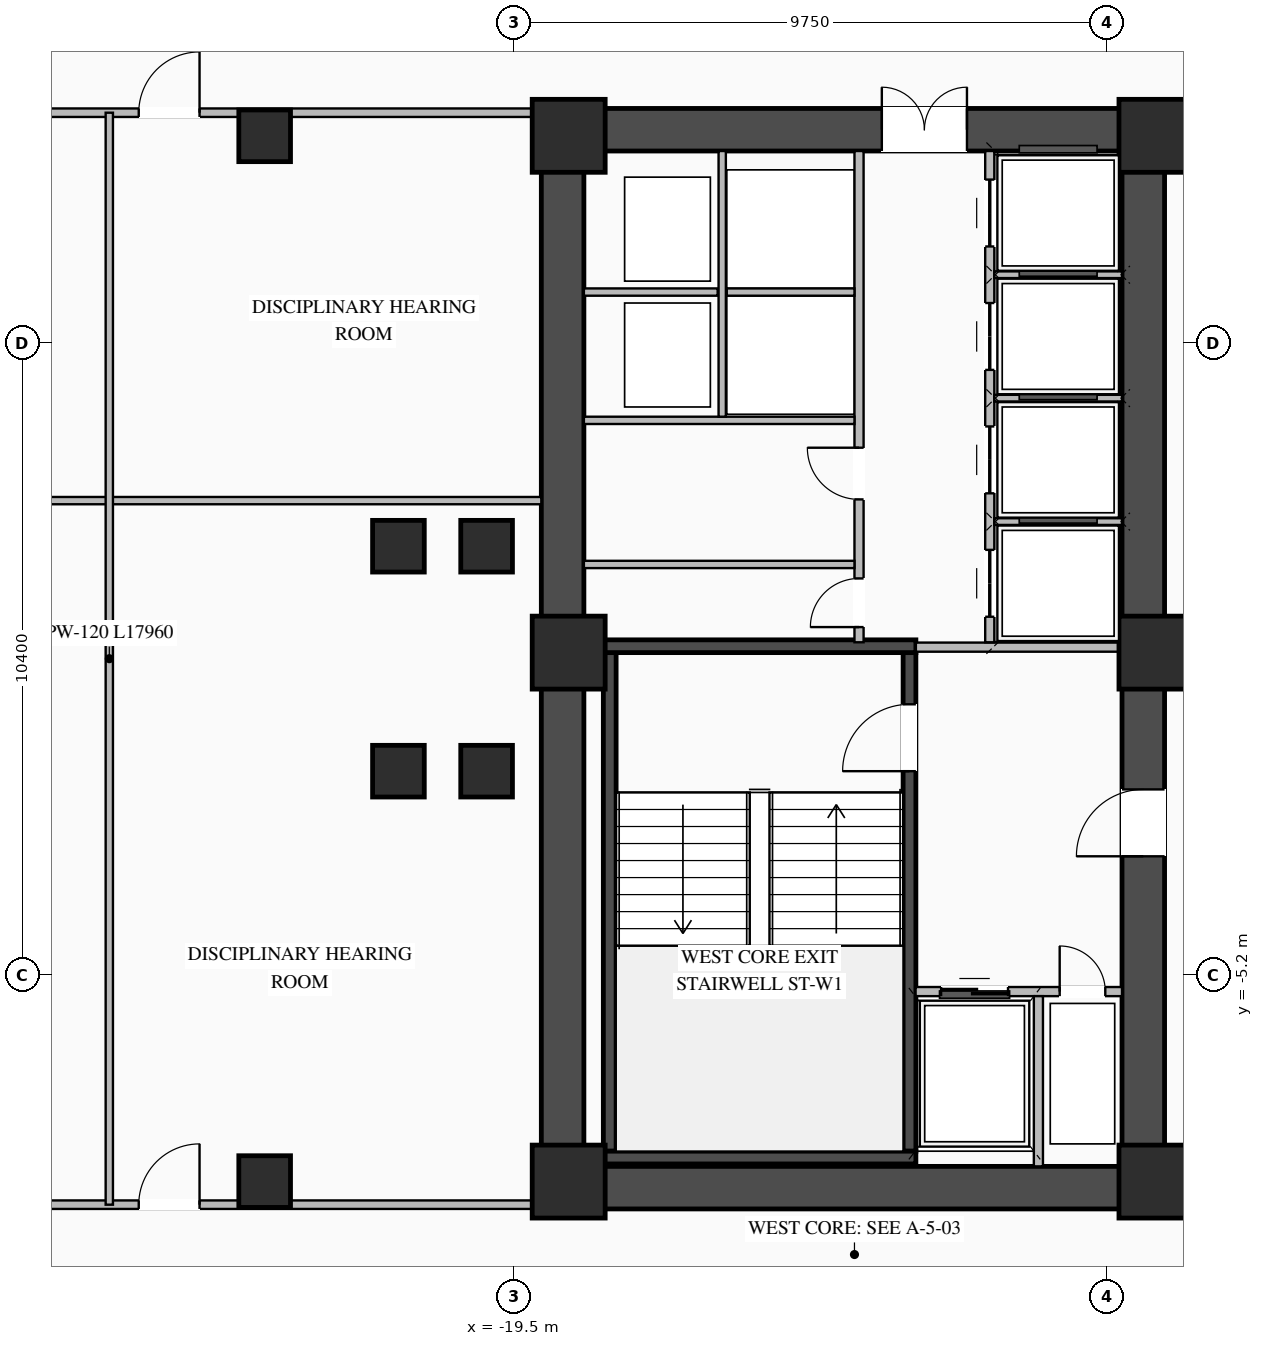
"""IFC4 building model, lengths in metres.
Left out: names, types, materials, properties, quantities, classifications, styles, units other than length and angle.
Written with IfcOpenShell. Run it as: python <this file> out.ifc"""

import sys

from ifc_helpers import new_model, si_unit, direction, frame, frame_2d, origin, origin_2d, place, context, subcontext, project, spatial, rectangle, i_section, extrude, element, fill, save


model = new_model("IFC4")
c1 = context("Model", 3, precision=1e-05, world=origin(), true_north=direction((0.0, 1.0)))
c2 = subcontext(c1, "Body", "Model", "MODEL_VIEW")
j1 = project(units=[si_unit("LENGTHUNIT", "METRE"), si_unit("PLANEANGLEUNIT", "RADIAN")], contexts=[c1])
p1 = place(None, origin())
s1 = spatial("IfcSite", under=j1, at=p1, CompositionType="ELEMENT")
p2 = place(p1, origin())
s2 = spatial("IfcBuilding", under=s1, at=p2, CompositionType="ELEMENT")
p3 = place(p2, frame((0.0, 0.0, 58.8)))
s3 = spatial("IfcBuildingStorey", under=s2, at=p3, CompositionType="ELEMENT", Elevation=58.8)
p4 = place(p3, frame((-19.05, -8.7, 0.0), z_axis=(0.0, 0.0, 1.0), x_axis=(1.0, 0.0, 0.0)))
e1 = element("IfcWall", 1, at=p4, inside=s3, PredefinedType="SHEAR", context=c2, shape_type="SweptSolid", body=[
    extrude(rectangle(XDim=10.25, YDim=0.7, at=frame_2d((5.125, 0.0))), origin(), (0.0, 0.0, 1.0), 3.27),
])
p5 = place(p3, frame((-19.05, 8.7, 0.0), z_axis=(0.0, 0.0, 1.0), x_axis=(1.0, 0.0, 0.0)))
e2 = element("IfcWall", 2, at=p5, inside=s3, PredefinedType="SHEAR", context=c2, shape_type="SweptSolid", body=[
    extrude(rectangle(XDim=10.25, YDim=0.7, at=frame_2d((5.125, 0.0))), origin(), (0.0, 0.0, 1.0), 3.27),
])
p6 = place(p5, frame((5.6, 0.0, 0.0)))
e3 = element("IfcOpeningElement", 3, at=p6, cuts=e2, PredefinedType="OPENING", context=c2, shape_type="SweptSolid", body=[
    extrude(rectangle(XDim=1.4, YDim=2.05, at=frame_2d((0.7, 1.025))), frame((0.0, 0.36, 0.0), z_axis=(0.0, -1.0, 0.0), x_axis=(1.0, 0.0, 0.0)), (0.0, 0.0, 1.0), 0.72),
])
p7 = place(p3, frame((-18.7, -8.35, 0.0), z_axis=(0.0, 0.0, 1.0), x_axis=(0.0, 1.0, 0.0)))
e4 = element("IfcWall", 4, at=p7, inside=s3, PredefinedType="SHEAR", context=c2, shape_type="SweptSolid", body=[
    extrude(rectangle(XDim=16.7, YDim=0.7, at=frame_2d((8.35, 0.0))), origin(), (0.0, 0.0, 1.0), 3.27),
])
p8 = place(p3, frame((-9.15, -8.35, 0.0), z_axis=(0.0, 0.0, 1.0), x_axis=(0.0, 1.0, 0.0)))
e5 = element("IfcWall", 5, at=p8, inside=s3, PredefinedType="SHEAR", context=c2, shape_type="SweptSolid", body=[
    extrude(rectangle(XDim=16.7, YDim=0.7, at=frame_2d((8.35, 0.0))), origin(), (0.0, 0.0, 1.0), 3.27),
])
p9 = place(p8, frame((5.1, 0.0, 0.0)))
e6 = element("IfcOpeningElement", 6, at=p9, cuts=e5, PredefinedType="OPENING", context=c2, shape_type="SweptSolid", body=[
    extrude(rectangle(XDim=1.1, YDim=2.08, at=frame_2d((0.55, 1.04))), frame((0.0, 0.36, 0.0), z_axis=(0.0, -1.0, 0.0), x_axis=(1.0, 0.0, 0.0)), (0.0, 0.0, 1.0), 0.72),
])
p10 = place(p3, frame((-12.995, -8.1, 0.0), z_axis=(0.0, 0.0, 1.0), x_axis=(0.0, 1.0, 0.0)))
e7 = element("IfcWall", 7, at=p10, inside=s3, PredefinedType="SHEAR", context=c2, shape_type="SweptSolid", body=[
    extrude(rectangle(XDim=8.2, YDim=0.21, at=frame_2d((4.1, 0.0))), origin(), (0.0, 0.0, 1.0), 3.27),
])
p11 = place(p10, frame((6.25, 0.0, 0.0)))
e8 = element("IfcOpeningElement", 8, at=p11, cuts=e7, PredefinedType="OPENING", context=c2, shape_type="SweptSolid", body=[
    extrude(rectangle(XDim=1.1, YDim=2.15, at=frame_2d((0.55, 1.075))), frame((0.0, 0.115, 0.0), z_axis=(0.0, -1.0, 0.0), x_axis=(1.0, 0.0, 0.0)), (0.0, 0.0, 1.0), 0.23),
])
p12 = place(p3, frame((-17.925, -8.1, 0.0), z_axis=(0.0, 0.0, 1.0), x_axis=(0.0, 1.0, 0.0)))
e9 = element("IfcWall", 9, at=p12, inside=s3, PredefinedType="SHEAR", context=c2, shape_type="SweptSolid", body=[
    extrude(rectangle(XDim=8.2, YDim=0.21, at=frame_2d((4.1, 0.0))), origin(), (0.0, 0.0, 1.0), 3.27),
])
for number, where, z_axis, x_axis in (
    (10, (-18.03, -8.205, 0.0), (0.0, 0.0, 1.0), (1.0, 0.0, 0.0)),
    (11, (-12.89, 0.205, 0.0), (0.0, 0.0, 1.0), (-1.0, 0.0, 0.0)),
):
    element("IfcWall", number, at=place(p3, frame(where, z_axis=z_axis, x_axis=x_axis)), inside=s3, PredefinedType="SHEAR", context=c2, shape_type="SweptSolid", body=[
        extrude(rectangle(XDim=5.14, YDim=0.21, at=frame_2d((2.57, 0.0))), origin(), (0.0, 0.0, 1.0), 3.27),
    ])
for number, where, z_axis, x_axis in (
    (12, (-8.95, -8.6, 0.0), (0.0, 0.0, 1.0), (1.0, 0.0, 0.0)),
    (13, (-8.95, 0.1, 0.0), (0.0, 0.0, 1.0), (1.0, 0.0, 0.0)),
    (14, (-8.95, 8.6, 0.0), (0.0, 0.0, 1.0), (1.0, 0.0, 0.0)),
    (15, (-18.6, -8.6, 0.0), (0.0, 0.0, 1.0), (1.0, 0.0, 0.0)),
    (16, (-18.6, 0.1, 0.0), (0.0, 0.0, 1.0), (1.0, 0.0, 0.0)),
    (17, (-18.6, 8.6, 0.0), (0.0, 0.0, 1.0), (1.0, 0.0, 0.0)),
):
    element("IfcColumn", number, at=place(p3, frame(where, z_axis=z_axis, x_axis=x_axis)), inside=s3, PredefinedType="COLUMN", context=c2, shape_type="SweptSolid", body=[
        extrude(rectangle(XDim=1.2, YDim=1.2, at=origin_2d()), origin(), (0.0, 0.0, 1.0), 3.45),
    ])
for number, where, z_axis, x_axis in (
    (18, (-21.4, -1.85, 0.0), (0.0, 0.0, 1.0), (1.0, 0.0, 0.0)),
    (19, (-21.4, 1.85, 0.0), (0.0, 0.0, 1.0), (1.0, 0.0, 0.0)),
    (20, (-19.95, -1.85, 0.0), (0.0, 0.0, 1.0), (1.0, 0.0, 0.0)),
    (21, (-19.95, 1.85, 0.0), (0.0, 0.0, 1.0), (1.0, 0.0, 0.0)),
    (22, (-23.6, -8.6, 0.0), (0.0, 0.0, 1.0), (1.0, 0.0, 0.0)),
    (23, (-23.6, 8.6, 0.0), (0.0, 0.0, 1.0), (1.0, 0.0, 0.0)),
):
    element("IfcColumn", number, at=place(p3, frame(where, z_axis=z_axis, x_axis=x_axis)), inside=s3, PredefinedType="COLUMN", context=c2, shape_type="SweptSolid", body=[
        extrude(i_section(OverallWidth=0.85, OverallDepth=0.85, WebThickness=0.032, FlangeThickness=0.048, at=origin_2d()), origin(), (0.0, 0.0, 1.0), 3.45),
    ])
p13 = place(p3, frame((-12.895, -5.475, 0.0), z_axis=(0.0, 0.0, 1.0), x_axis=(1.0, 0.0, 0.0)))
e24 = element("IfcWall", 24, at=p13, inside=s3, PredefinedType="STANDARD", context=c2, shape_type="SweptSolid", body=[
    extrude(rectangle(XDim=3.395, YDim=0.15, at=frame_2d((1.698, 0.0))), origin(), (0.0, 0.0, 1.0), 3.25),
])
p14 = place(p13, frame((0.42, 0.0, 0.0)))
e25 = element("IfcOpeningElement", 25, at=p14, cuts=e24, PredefinedType="OPENING", context=c2, shape_type="SweptSolid", body=[
    extrude(rectangle(XDim=1.1, YDim=2.15, at=frame_2d((0.55, 1.075))), frame((0.0, 0.085, 0.0), z_axis=(0.0, -1.0, 0.0), x_axis=(1.0, 0.0, 0.0)), (0.0, 0.0, 1.0), 0.17),
])
p15 = place(p13, frame((2.37, 0.0, 0.0)))
e26 = element("IfcOpeningElement", 26, at=p15, cuts=e24, PredefinedType="OPENING", context=c2, shape_type="SweptSolid", body=[
    extrude(rectangle(XDim=0.75, YDim=2.05, at=frame_2d((0.375, 1.025))), frame((0.0, 0.085, 0.0), z_axis=(0.0, -1.0, 0.0), x_axis=(1.0, 0.0, 0.0)), (0.0, 0.0, 1.0), 0.17),
])
p16 = place(p3, frame((-10.875, -8.35, 0.0), z_axis=(0.0, 0.0, 1.0), x_axis=(0.0, 1.0, 0.0)))
e27 = element("IfcWall", 27, at=p16, inside=s3, PredefinedType="STANDARD", context=c2, shape_type="SweptSolid", body=[
    extrude(rectangle(XDim=2.8, YDim=0.15, at=frame_2d((1.4, 0.0))), origin(), (0.0, 0.0, 1.0), 3.25),
])
p17 = place(p3, frame((-12.89, 0.19, 0.0), z_axis=(0.0, 0.0, 1.0), x_axis=(1.0, 0.0, 0.0)))
e28 = element("IfcWall", 28, at=p17, inside=s3, PredefinedType="STANDARD", context=c2, shape_type="SweptSolid", body=[
    extrude(rectangle(XDim=3.39, YDim=0.15, at=frame_2d((1.695, 0.0))), origin(), (0.0, 0.0, 1.0), 2.645),
])
p18 = place(p3, frame((-11.675, 0.27, 0.0), z_axis=(0.0, 0.0, 1.0), x_axis=(0.0, 1.0, 0.0)))
e29 = element("IfcWall", 29, at=p18, inside=s3, PredefinedType="STANDARD", context=c2, shape_type="SweptSolid", body=[
    extrude(rectangle(XDim=8.08, YDim=0.15, at=frame_2d((4.04, 0.0))), origin(), (0.0, 0.0, 1.0), 3.25),
])
p19 = place(p18, frame((0.42, 0.0, 0.0)))
e30 = element("IfcOpeningElement", 30, at=p19, cuts=e29, PredefinedType="OPENING", context=c2, shape_type="SweptSolid", body=[
    extrude(rectangle(XDim=1.1, YDim=2.1, at=frame_2d((0.55, 1.05))), frame((0.0, 0.085, 0.0), z_axis=(0.0, -1.0, 0.0), x_axis=(1.0, 0.0, 0.0)), (0.0, 0.0, 1.0), 0.17),
])
p20 = place(p18, frame((2.45, 0.0, 0.0)))
e31 = element("IfcOpeningElement", 31, at=p20, cuts=e29, PredefinedType="OPENING", context=c2, shape_type="SweptSolid", body=[
    extrude(rectangle(XDim=1.1, YDim=2.1, at=frame_2d((0.55, 1.05))), frame((0.0, 0.085, 0.0), z_axis=(0.0, -1.0, 0.0), x_axis=(1.0, 0.0, 0.0)), (0.0, 0.0, 1.0), 0.17),
])
p21 = place(p18, frame((4.48, 0.0, 0.0)))
e32 = element("IfcOpeningElement", 32, at=p21, cuts=e29, PredefinedType="OPENING", context=c2, shape_type="SweptSolid", body=[
    extrude(rectangle(XDim=1.1, YDim=2.1, at=frame_2d((0.55, 1.05))), frame((0.0, 0.085, 0.0), z_axis=(0.0, -1.0, 0.0), x_axis=(1.0, 0.0, 0.0)), (0.0, 0.0, 1.0), 0.17),
])
p22 = place(p18, frame((6.51, 0.0, 0.0)))
e33 = element("IfcOpeningElement", 33, at=p22, cuts=e29, PredefinedType="OPENING", context=c2, shape_type="SweptSolid", body=[
    extrude(rectangle(XDim=1.1, YDim=2.1, at=frame_2d((0.55, 1.05))), frame((0.0, 0.085, 0.0), z_axis=(0.0, -1.0, 0.0), x_axis=(1.0, 0.0, 0.0)), (0.0, 0.0, 1.0), 0.17),
])
for number, where, z_axis, x_axis in (
    (34, (-11.6, 2.255, 0.0), (0.0, 0.0, 1.0), (1.0, 0.0, 0.0)),
    (35, (-11.6, 4.285, 0.0), (0.0, 0.0, 1.0), (1.0, 0.0, 0.0)),
    (36, (-11.6, 6.315, 0.0), (0.0, 0.0, 1.0), (1.0, 0.0, 0.0)),
):
    element("IfcWall", number, at=place(p3, frame(where, z_axis=z_axis, x_axis=x_axis)), inside=s3, PredefinedType="STANDARD", context=c2, shape_type="SweptSolid", body=[
        extrude(rectangle(XDim=2.1, YDim=0.11, at=frame_2d((1.05, 0.0))), origin(), (0.0, 0.0, 1.0), 3.25),
    ])
p23 = place(p3, frame((-13.825, 0.27, 0.0), z_axis=(0.0, 0.0, 1.0), x_axis=(0.0, 1.0, 0.0)))
e37 = element("IfcWall", 37, at=p23, inside=s3, PredefinedType="STANDARD", context=c2, shape_type="SweptSolid", body=[
    extrude(rectangle(XDim=8.08, YDim=0.15, at=frame_2d((4.04, 0.0))), origin(), (0.0, 0.0, 1.0), 3.25),
])
p24 = place(p23, frame((0.25, 0.0, 0.0)))
e38 = element("IfcOpeningElement", 38, at=p24, cuts=e37, PredefinedType="OPENING", context=c2, shape_type="SweptSolid", body=[
    extrude(rectangle(XDim=0.8, YDim=2.05, at=frame_2d((0.4, 1.025))), frame((0.0, 0.085, 0.0), z_axis=(0.0, -1.0, 0.0), x_axis=(1.0, 0.0, 0.0)), (0.0, 0.0, 1.0), 0.17),
])
p25 = place(p23, frame((2.35, 0.0, 0.0)))
e39 = element("IfcOpeningElement", 39, at=p25, cuts=e37, PredefinedType="OPENING", context=c2, shape_type="SweptSolid", body=[
    extrude(rectangle(XDim=0.85, YDim=2.05, at=frame_2d((0.425, 1.025))), frame((0.0, 0.085, 0.0), z_axis=(0.0, -1.0, 0.0), x_axis=(1.0, 0.0, 0.0)), (0.0, 0.0, 1.0), 0.17),
])
p26 = place(p3, frame((-18.35, 3.92, 0.0), z_axis=(0.0, 0.0, 1.0), x_axis=(1.0, 0.0, 0.0)))
e40 = element("IfcWall", 40, at=p26, inside=s3, PredefinedType="STANDARD", context=c2, shape_type="SweptSolid", body=[
    extrude(rectangle(XDim=4.45, YDim=0.12, at=frame_2d((2.225, 0.0))), origin(), (0.0, 0.0, 1.0), 3.25),
])
p27 = place(p3, frame((-18.35, 6.03, 0.0), z_axis=(0.0, 0.0, 1.0), x_axis=(1.0, 0.0, 0.0)))
e41 = element("IfcWall", 41, at=p27, inside=s3, PredefinedType="STANDARD", context=c2, shape_type="SweptSolid", body=[
    extrude(rectangle(XDim=2.2, YDim=0.12, at=frame_2d((1.1, 0.0))), origin(), (0.0, 0.0, 1.0), 3.25),
])
p28 = place(p3, frame((-16.075, 3.98, 0.0), z_axis=(0.0, 0.0, 1.0), x_axis=(0.0, 1.0, 0.0)))
e42 = element("IfcWall", 42, at=p28, inside=s3, PredefinedType="STANDARD", context=c2, shape_type="SweptSolid", body=[
    extrude(rectangle(XDim=4.37, YDim=0.12, at=frame_2d((2.185, 0.0))), origin(), (0.0, 0.0, 1.0), 3.25),
])
p29 = place(p3, frame((-16.0, 6.03, 0.0), z_axis=(0.0, 0.0, 1.0), x_axis=(1.0, 0.0, 0.0)))
e43 = element("IfcWall", 43, at=p29, inside=s3, PredefinedType="STANDARD", context=c2, shape_type="SweptSolid", body=[
    extrude(rectangle(XDim=2.1, YDim=0.12, at=frame_2d((1.05, 0.0))), origin(), (0.0, 0.0, 1.0), 3.25),
])
p30 = place(p3, frame((-18.35, 1.55, 0.0), z_axis=(0.0, 0.0, 1.0), x_axis=(1.0, 0.0, 0.0)))
e44 = element("IfcWall", 44, at=p30, inside=s3, PredefinedType="STANDARD", context=c2, shape_type="SweptSolid", body=[
    extrude(rectangle(XDim=4.45, YDim=0.12, at=frame_2d((2.225, 0.0))), origin(), (0.0, 0.0, 1.0), 3.25),
])
p31 = place(p3, frame((-35.62, 8.98, 0.0), z_axis=(0.0, 0.0, 1.0), x_axis=(1.0, 0.0, 0.0)))
e45 = element("IfcWall", 45, at=p31, inside=s3, PredefinedType="STANDARD", context=c2, shape_type="SweptSolid", body=[
    extrude(rectangle(XDim=16.57, YDim=0.14, at=frame_2d((8.285, 0.0))), origin(), (0.0, 0.0, 1.0), 3.25),
])
p32 = place(p31, frame((4.363, 0.0, 0.0)))
e46 = element("IfcOpeningElement", 46, at=p32, cuts=e45, PredefinedType="OPENING", context=c2, shape_type="SweptSolid", body=[
    extrude(rectangle(XDim=1.0, YDim=2.08, at=frame_2d((0.5, 1.04))), frame((0.0, 0.08, 0.0), z_axis=(0.0, -1.0, 0.0), x_axis=(1.0, 0.0, 0.0)), (0.0, 0.0, 1.0), 0.16),
])
p33 = place(p31, frame((9.949, 0.0, 0.0)))
e47 = element("IfcOpeningElement", 47, at=p33, cuts=e45, PredefinedType="OPENING", context=c2, shape_type="SweptSolid", body=[
    extrude(rectangle(XDim=1.0, YDim=2.08, at=frame_2d((0.5, 1.04))), frame((0.0, 0.08, 0.0), z_axis=(0.0, -1.0, 0.0), x_axis=(1.0, 0.0, 0.0)), (0.0, 0.0, 1.0), 0.16),
])
p34 = place(p3, frame((-35.62, -8.98, 0.0), z_axis=(0.0, 0.0, 1.0), x_axis=(1.0, 0.0, 0.0)))
e48 = element("IfcWall", 48, at=p34, inside=s3, PredefinedType="STANDARD", context=c2, shape_type="SweptSolid", body=[
    extrude(rectangle(XDim=16.57, YDim=0.14, at=frame_2d((8.285, 0.0))), origin(), (0.0, 0.0, 1.0), 3.25),
])
p35 = place(p34, frame((4.363, 0.0, 0.0)))
e49 = element("IfcOpeningElement", 49, at=p35, cuts=e48, PredefinedType="OPENING", context=c2, shape_type="SweptSolid", body=[
    extrude(rectangle(XDim=1.0, YDim=2.08, at=frame_2d((0.5, 1.04))), frame((0.0, 0.08, 0.0), z_axis=(0.0, -1.0, 0.0), x_axis=(1.0, 0.0, 0.0)), (0.0, 0.0, 1.0), 0.16),
])
p36 = place(p34, frame((9.949, 0.0, 0.0)))
e50 = element("IfcOpeningElement", 50, at=p36, cuts=e48, PredefinedType="OPENING", context=c2, shape_type="SweptSolid", body=[
    extrude(rectangle(XDim=1.0, YDim=2.08, at=frame_2d((0.5, 1.04))), frame((0.0, 0.08, 0.0), z_axis=(0.0, -1.0, 0.0), x_axis=(1.0, 0.0, 0.0)), (0.0, 0.0, 1.0), 0.16),
])
p37 = place(p3, frame((-35.62, 2.6, 0.0), z_axis=(0.0, 0.0, 1.0), x_axis=(1.0, 0.0, 0.0)))
e51 = element("IfcWall", 51, at=p37, inside=s3, PredefinedType="STANDARD", context=c2, shape_type="SweptSolid", body=[
    extrude(rectangle(XDim=16.57, YDim=0.12, at=frame_2d((8.285, 0.0))), origin(), (0.0, 0.0, 1.0), 3.25),
])
p38 = place(p3, frame((-26.155, -8.98, 0.0), z_axis=(0.0, 0.0, 1.0), x_axis=(0.0, 1.0, 0.0)))
e52 = element("IfcWall", 52, at=p38, inside=s3, PredefinedType="STANDARD", context=c2, shape_type="SweptSolid", body=[
    extrude(rectangle(XDim=17.96, YDim=0.12, at=frame_2d((8.98, 0.0))), origin(), (0.0, 0.0, 1.0), 3.25),
])
p39 = place(p11, origin())
e53 = element("IfcDoor", 53, at=p39, inside=s3, OperationType="SINGLE_SWING_LEFT", PredefinedType="DOOR", context=c2, shape_type="SweptSolid", body=[
    extrude(rectangle(XDim=1.1, YDim=2.15, at=frame_2d((0.55, 1.075))), frame((0.0, 0.025, 0.0), z_axis=(0.0, -1.0, 0.0), x_axis=(1.0, 0.0, 0.0)), (0.0, 0.0, 1.0), 0.05),
])
fill(e8, e53)
p40 = place(p14, origin())
e54 = element("IfcDoor", 54, at=p40, inside=s3, OperationType="DOUBLE_DOOR_SLIDING", PredefinedType="DOOR", context=c2, shape_type="SweptSolid", body=[
    extrude(rectangle(XDim=1.1, YDim=2.15, at=frame_2d((0.55, 1.075))), frame((0.0, 0.025, 0.0), z_axis=(0.0, -1.0, 0.0), x_axis=(1.0, 0.0, 0.0)), (0.0, 0.0, 1.0), 0.05),
])
fill(e25, e54)
p41 = place(p15, origin())
e55 = element("IfcDoor", 55, at=p41, inside=s3, OperationType="SINGLE_SWING_LEFT", PredefinedType="DOOR", context=c2, shape_type="SweptSolid", body=[
    extrude(rectangle(XDim=0.75, YDim=2.05, at=frame_2d((0.375, 1.025))), frame((0.0, 0.025, 0.0), z_axis=(0.0, -1.0, 0.0), x_axis=(1.0, 0.0, 0.0)), (0.0, 0.0, 1.0), 0.05),
])
fill(e26, e55)
p42 = place(p9, origin())
e56 = element("IfcDoor", 56, at=p42, inside=s3, OperationType="SINGLE_SWING_LEFT", PredefinedType="DOOR", context=c2, shape_type="SweptSolid", body=[
    extrude(rectangle(XDim=1.1, YDim=2.08, at=frame_2d((0.55, 1.04))), frame((0.0, 0.305, 0.0), z_axis=(0.0, -1.0, 0.0), x_axis=(1.0, 0.0, 0.0)), (0.0, 0.0, 1.0), 0.05),
])
fill(e6, e56)
p43 = place(p6, origin())
e57 = element("IfcDoor", 57, at=p43, inside=s3, OperationType="DOUBLE_DOOR_SINGLE_SWING", PredefinedType="DOOR", context=c2, shape_type="SweptSolid", body=[
    extrude(rectangle(XDim=1.4, YDim=2.05, at=frame_2d((0.7, 1.025))), frame((0.0, 0.295, 0.0), z_axis=(0.0, -1.0, 0.0), x_axis=(1.0, 0.0, 0.0)), (0.0, 0.0, 1.0), 0.05),
])
fill(e3, e57)
p44 = place(p19, origin())
e58 = element("IfcDoor", 58, at=p44, inside=s3, OperationType="DOUBLE_DOOR_SLIDING", PredefinedType="DOOR", context=c2, shape_type="SweptSolid", body=[
    extrude(rectangle(XDim=1.1, YDim=2.1, at=frame_2d((0.55, 1.05))), frame((0.0, 0.025, 0.0), z_axis=(0.0, -1.0, 0.0), x_axis=(1.0, 0.0, 0.0)), (0.0, 0.0, 1.0), 0.05),
])
fill(e30, e58)
p45 = place(p20, origin())
e59 = element("IfcDoor", 59, at=p45, inside=s3, OperationType="DOUBLE_DOOR_SLIDING", PredefinedType="DOOR", context=c2, shape_type="SweptSolid", body=[
    extrude(rectangle(XDim=1.1, YDim=2.1, at=frame_2d((0.55, 1.05))), frame((0.0, 0.025, 0.0), z_axis=(0.0, -1.0, 0.0), x_axis=(1.0, 0.0, 0.0)), (0.0, 0.0, 1.0), 0.05),
])
fill(e31, e59)
p46 = place(p21, origin())
e60 = element("IfcDoor", 60, at=p46, inside=s3, OperationType="DOUBLE_DOOR_SLIDING", PredefinedType="DOOR", context=c2, shape_type="SweptSolid", body=[
    extrude(rectangle(XDim=1.1, YDim=2.1, at=frame_2d((0.55, 1.05))), frame((0.0, 0.025, 0.0), z_axis=(0.0, -1.0, 0.0), x_axis=(1.0, 0.0, 0.0)), (0.0, 0.0, 1.0), 0.05),
])
fill(e32, e60)
p47 = place(p22, origin())
e61 = element("IfcDoor", 61, at=p47, inside=s3, OperationType="DOUBLE_DOOR_SLIDING", PredefinedType="DOOR", context=c2, shape_type="SweptSolid", body=[
    extrude(rectangle(XDim=1.1, YDim=2.1, at=frame_2d((0.55, 1.05))), frame((0.0, 0.025, 0.0), z_axis=(0.0, -1.0, 0.0), x_axis=(1.0, 0.0, 0.0)), (0.0, 0.0, 1.0), 0.05),
])
fill(e33, e61)
p48 = place(p24, origin())
e62 = element("IfcDoor", 62, at=p48, inside=s3, OperationType="SINGLE_SWING_LEFT", PredefinedType="DOOR", context=c2, shape_type="SweptSolid", body=[
    extrude(rectangle(XDim=0.8, YDim=2.05, at=frame_2d((0.4, 1.025))), frame((0.0, 0.025, 0.0), z_axis=(0.0, -1.0, 0.0), x_axis=(1.0, 0.0, 0.0)), (0.0, 0.0, 1.0), 0.05),
])
fill(e38, e62)
p49 = place(p25, origin())
e63 = element("IfcDoor", 63, at=p49, inside=s3, OperationType="SINGLE_SWING_RIGHT", PredefinedType="DOOR", context=c2, shape_type="SweptSolid", body=[
    extrude(rectangle(XDim=0.85, YDim=2.05, at=frame_2d((0.425, 1.025))), frame((0.0, 0.025, 0.0), z_axis=(0.0, -1.0, 0.0), x_axis=(1.0, 0.0, 0.0)), (0.0, 0.0, 1.0), 0.05),
])
fill(e39, e63)
p50 = place(p33, origin())
e64 = element("IfcDoor", 64, at=p50, inside=s3, OperationType="SINGLE_SWING_RIGHT", PredefinedType="DOOR", context=c2, shape_type="SweptSolid", body=[
    extrude(rectangle(XDim=1.0, YDim=2.08, at=frame_2d((0.5, 1.04))), frame((0.0, 0.025, 0.0), z_axis=(0.0, -1.0, 0.0), x_axis=(1.0, 0.0, 0.0)), (0.0, 0.0, 1.0), 0.05),
])
fill(e47, e64)
p51 = place(p36, origin())
e65 = element("IfcDoor", 65, at=p51, inside=s3, OperationType="SINGLE_SWING_RIGHT", PredefinedType="DOOR", context=c2, shape_type="SweptSolid", body=[
    extrude(rectangle(XDim=1.0, YDim=2.08, at=frame_2d((0.5, 1.04))), frame((0.0, 0.025, 0.0), z_axis=(0.0, -1.0, 0.0), x_axis=(1.0, 0.0, 0.0)), (0.0, 0.0, 1.0), 0.05),
])
fill(e50, e65)
save(model, sys.argv[1])
